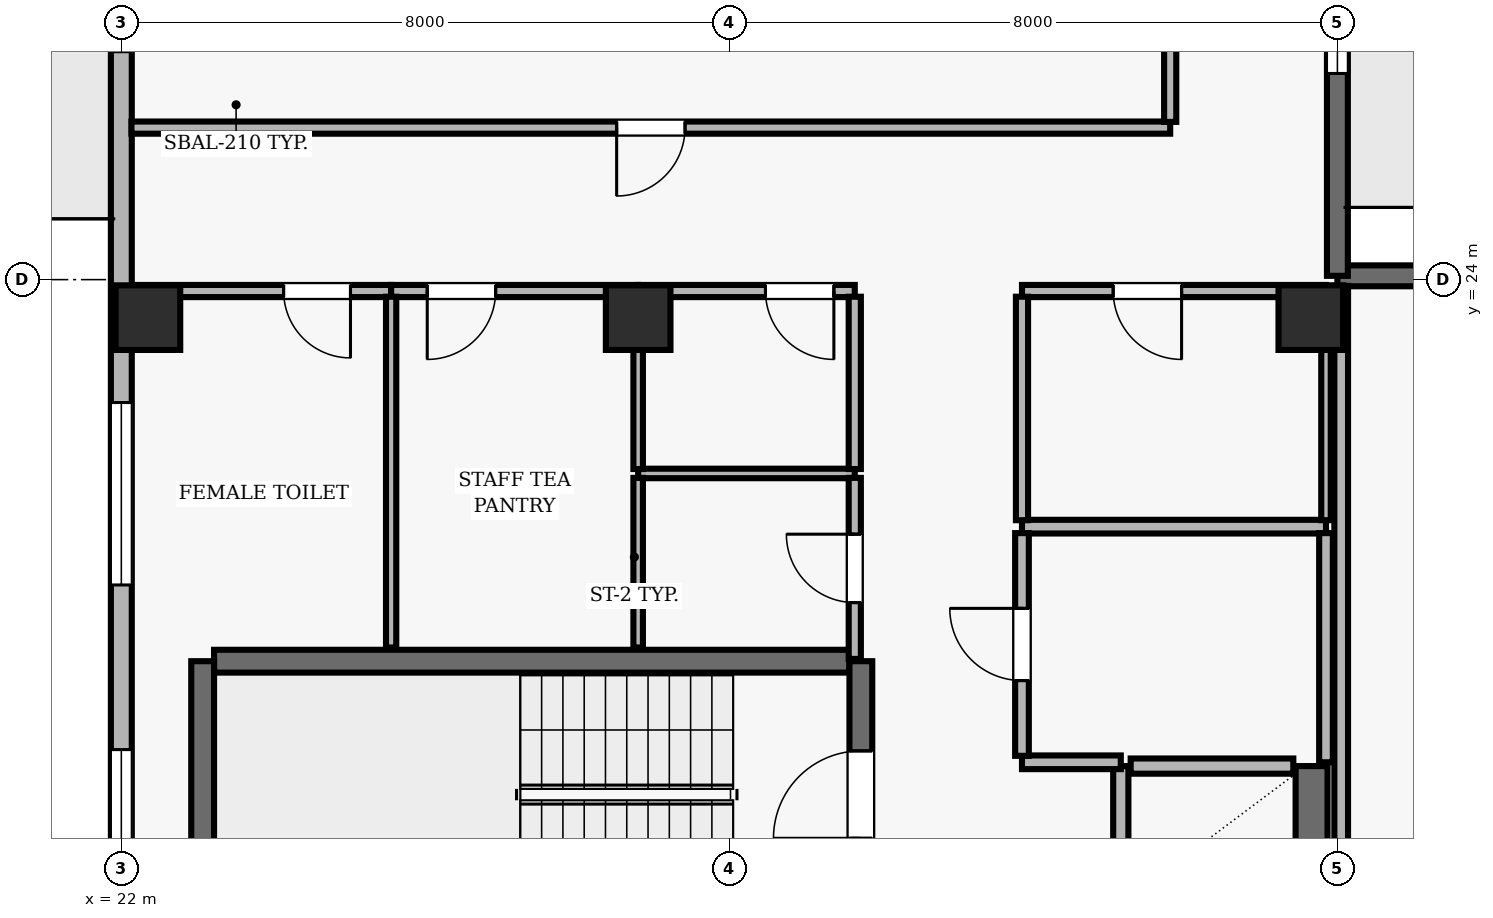
"""IFC4 building model, lengths in metres.
Left out: names, types, materials, properties, quantities, classifications, styles, units other than length and angle.
Written with IfcOpenShell. Run it as: python <this file> out.ifc"""

import sys

from ifc_helpers import new_model, si_unit, direction, frame, frame_2d, origin, origin_2d, place, context, subcontext, project, spatial, rectangle, extrude, element, fill, save


model = new_model("IFC4")
c1 = context("Model", 3, precision=1e-05, world=origin(), true_north=direction((0.0, 1.0)))
c2 = subcontext(c1, "Body", "Model", "MODEL_VIEW")
j1 = project(units=[si_unit("LENGTHUNIT", "METRE"), si_unit("PLANEANGLEUNIT", "RADIAN")], contexts=[c1])
p1 = place(None, origin())
s1 = spatial("IfcSite", under=j1, at=p1, CompositionType="ELEMENT")
p2 = place(p1, origin())
s2 = spatial("IfcBuilding", under=s1, at=p2, CompositionType="ELEMENT")
p3 = place(p2, frame((0.0, 0.0, 263.8)))
s3 = spatial("IfcBuildingStorey", under=s2, at=p3, CompositionType="ELEMENT", Elevation=263.8)
for number, where, z_axis, x_axis in (
    (1, (22.35, 23.5, 0.0), (0.0, 0.0, 1.0), (1.0, 0.0, 0.0)),
    (2, (28.8, 23.5, 0.0), (0.0, 0.0, 1.0), (1.0, 0.0, 0.0)),
    (3, (37.65, 23.5, 0.0), (0.0, 0.0, 1.0), (1.0, 0.0, 0.0)),
):
    element("IfcColumn", number, at=place(p3, frame(where, z_axis=z_axis, x_axis=x_axis)), inside=s3, PredefinedType="COLUMN", context=c2, shape_type="SweptSolid", body=[
        extrude(rectangle(XDim=0.85, YDim=0.85, at=origin_2d()), origin(), (0.0, 0.0, 1.0), 3.9),
    ])
p4 = place(p3, frame((43.0, 24.05, 0.0), z_axis=(0.0, 0.0, 1.0), x_axis=(-1.0, 0.0, 0.0)))
e4 = element("IfcWall", 4, at=p4, inside=s3, PredefinedType="SOLIDWALL", context=c2, shape_type="SweptSolid", body=[
    extrude(rectangle(XDim=5.0, YDim=0.275, at=frame_2d((2.5, 0.0))), origin(), (0.0, 0.0, 1.0), 3.69),
])
p5 = place(p3, frame((38.0, 24.05, 0.0), z_axis=(0.0, 0.0, 1.0), x_axis=(0.0, 1.0, 0.0)))
e5 = element("IfcWall", 5, at=p5, inside=s3, PredefinedType="SOLIDWALL", context=c2, shape_type="SweptSolid", body=[
    extrude(rectangle(XDim=11.25, YDim=0.275, at=frame_2d((5.625, 0.0))), origin(), (0.0, 0.0, 1.0), 3.69),
])
p6 = place(p5, frame((7.425, 0.0, 0.0)))
e6 = element("IfcOpeningElement", 6, at=p6, cuts=e5, PredefinedType="OPENING", context=c2, shape_type="SweptSolid", body=[
    extrude(rectangle(XDim=1.0, YDim=2.2, at=frame_2d((0.5, 1.1))), frame((0.0, 0.147, 0.0), z_axis=(0.0, -1.0, 0.0), x_axis=(1.0, 0.0, 0.0)), (0.0, 0.0, 1.0), 0.295),
])
p7 = place(p5, frame((2.662, 0.0, 0.9)))
e7 = element("IfcOpeningElement", 7, at=p7, cuts=e5, PredefinedType="OPENING", context=c2, shape_type="SweptSolid", body=[
    extrude(rectangle(XDim=1.2, YDim=1.6, at=frame_2d((0.6, 0.8))), frame((0.0, 0.147, 0.0), z_axis=(0.0, -1.0, 0.0), x_axis=(1.0, 0.0, 0.0)), (0.0, 0.0, 1.0), 0.295),
])
p8 = place(p3, frame((22.0, 35.3, 0.0), z_axis=(0.0, 0.0, 1.0), x_axis=(0.0, -1.0, 0.0)))
e8 = element("IfcWall", 8, at=p8, inside=s3, PredefinedType="SOLIDWALL", context=c2, shape_type="SweptSolid", body=[
    extrude(rectangle(XDim=32.8, YDim=0.275, at=frame_2d((16.4, 0.0))), origin(), (0.0, 0.0, 1.0), 3.69),
])
p9 = place(p8, frame((7.3, 0.0, 0.0)))
e9 = element("IfcOpeningElement", 9, at=p9, cuts=e8, PredefinedType="OPENING", context=c2, shape_type="SweptSolid", body=[
    extrude(rectangle(XDim=1.0, YDim=2.2, at=frame_2d((0.5, 1.1))), frame((0.0, 0.147, 0.0), z_axis=(0.0, -1.0, 0.0), x_axis=(1.0, 0.0, 0.0)), (0.0, 0.0, 1.0), 0.295),
])
p10 = place(p8, frame((12.917, 0.0, 0.9)))
e10 = element("IfcOpeningElement", 10, at=p10, cuts=e8, PredefinedType="OPENING", context=c2, shape_type="SweptSolid", body=[
    extrude(rectangle(XDim=2.4, YDim=1.6, at=frame_2d((1.2, 0.8))), frame((0.0, 0.147, 0.0), z_axis=(0.0, -1.0, 0.0), x_axis=(1.0, 0.0, 0.0)), (0.0, 0.0, 1.0), 0.295),
])
p11 = place(p8, frame((17.483, 0.0, 0.9)))
e11 = element("IfcOpeningElement", 11, at=p11, cuts=e8, PredefinedType="OPENING", context=c2, shape_type="SweptSolid", body=[
    extrude(rectangle(XDim=2.4, YDim=1.6, at=frame_2d((1.2, 0.8))), frame((0.0, 0.147, 0.0), z_axis=(0.0, -1.0, 0.0), x_axis=(1.0, 0.0, 0.0)), (0.0, 0.0, 1.0), 0.295),
])
p12 = place(p8, frame((23.4, 0.0, 0.9)))
e12 = element("IfcOpeningElement", 12, at=p12, cuts=e8, PredefinedType="OPENING", context=c2, shape_type="SweptSolid", body=[
    extrude(rectangle(XDim=2.4, YDim=1.6, at=frame_2d((1.2, 0.8))), frame((0.0, 0.147, 0.0), z_axis=(0.0, -1.0, 0.0), x_axis=(1.0, 0.0, 0.0)), (0.0, 0.0, 1.0), 0.295),
])
p13 = place(p3, frame((31.58, 18.98, 0.0), z_axis=(0.0, 0.0, 1.0), x_axis=(-1.0, 0.0, 0.0)))
e13 = element("IfcWall", 13, at=p13, inside=s3, PredefinedType="SHEAR", context=c2, shape_type="SweptSolid", body=[
    extrude(rectangle(XDim=8.36, YDim=0.3, at=frame_2d((4.18, 0.0))), origin(), (0.0, 0.0, 1.0), 3.69),
])
p14 = place(p3, frame((23.07, 18.98, 0.0), z_axis=(0.0, 0.0, 1.0), x_axis=(0.0, -1.0, 0.0)))
e14 = element("IfcWall", 14, at=p14, inside=s3, PredefinedType="SHEAR", context=c2, shape_type="SweptSolid", body=[
    extrude(rectangle(XDim=3.51, YDim=0.3, at=frame_2d((1.755, 0.0))), origin(), (0.0, 0.0, 1.0), 3.69),
])
p15 = place(p3, frame((31.73, 15.47, 0.0), z_axis=(0.0, 0.0, 1.0), x_axis=(0.0, 1.0, 0.0)))
e15 = element("IfcWall", 15, at=p15, inside=s3, PredefinedType="SHEAR", context=c2, shape_type="SweptSolid", body=[
    extrude(rectangle(XDim=3.51, YDim=0.3, at=frame_2d((1.755, 0.0))), origin(), (0.0, 0.0, 1.0), 3.69),
])
p16 = place(p15, frame((1.18, 0.0, 0.0)))
e16 = element("IfcOpeningElement", 16, at=p16, cuts=e15, PredefinedType="OPENING", context=c2, shape_type="SweptSolid", body=[
    extrude(rectangle(XDim=1.15, YDim=2.15, at=frame_2d((0.575, 1.075))), frame((0.0, 0.16, 0.0), z_axis=(0.0, -1.0, 0.0), x_axis=(1.0, 0.0, 0.0)), (0.0, 0.0, 1.0), 0.32),
])
p17 = place(p3, frame((35.15, 17.6, 0.0), z_axis=(0.0, 0.0, 1.0), x_axis=(0.0, -1.0, 0.0)))
e17 = element("IfcWall", 17, at=p17, inside=s3, PredefinedType="SOLIDWALL", context=c2, shape_type="SweptSolid", body=[
    extrude(rectangle(XDim=1.85, YDim=0.2, at=frame_2d((0.925, 0.0))), origin(), (0.0, 0.0, 1.0), 3.69),
])
p18 = place(p3, frame((37.66, 15.75, 0.0), z_axis=(0.0, 0.0, 1.0), x_axis=(0.0, 1.0, 0.0)))
e18 = element("IfcWall", 18, at=p18, inside=s3, PredefinedType="SHEAR", context=c2, shape_type="SweptSolid", body=[
    extrude(rectangle(XDim=1.85, YDim=0.42, at=frame_2d((0.925, 0.0))), origin(), (0.0, 0.0, 1.0), 3.69),
])
p19 = place(p3, frame((37.42, 17.6, 0.0), z_axis=(0.0, 0.0, 1.0), x_axis=(-1.0, 0.0, 0.0)))
e19 = element("IfcWall", 19, at=p19, inside=s3, PredefinedType="SOLIDWALL", context=c2, shape_type="SweptSolid", body=[
    extrude(rectangle(XDim=2.14, YDim=0.2, at=frame_2d((1.07, 0.0))), origin(), (0.0, 0.0, 1.0), 3.69),
])
p20 = place(p3, frame((25.55, 23.85, 0.0), z_axis=(0.0, 0.0, 1.0), x_axis=(-1.0, 0.0, 0.0)))
e20 = element("IfcWall", 20, at=p20, inside=s3, PredefinedType="PARTITIONING", context=c2, shape_type="SweptSolid", body=[
    extrude(rectangle(XDim=3.35, YDim=0.16, at=frame_2d((1.675, 0.0))), origin(), (0.0, 0.0, 1.0), 3.221),
])
p21 = place(p20, frame((0.535, 0.0, 0.0)))
e21 = element("IfcOpeningElement", 21, at=p21, cuts=e20, PredefinedType="OPENING", context=c2, shape_type="SweptSolid", body=[
    extrude(rectangle(XDim=0.88, YDim=2.1, at=frame_2d((0.44, 1.05))), frame((0.0, 0.09, 0.0), z_axis=(0.0, -1.0, 0.0), x_axis=(1.0, 0.0, 0.0)), (0.0, 0.0, 1.0), 0.18),
])
p22 = place(p3, frame((28.8, 23.85, 0.0), z_axis=(0.0, 0.0, 1.0), x_axis=(-1.0, 0.0, 0.0)))
e22 = element("IfcWall", 22, at=p22, inside=s3, PredefinedType="PARTITIONING", context=c2, shape_type="SweptSolid", body=[
    extrude(rectangle(XDim=3.25, YDim=0.16, at=frame_2d((1.625, 0.0))), origin(), (0.0, 0.0, 1.0), 3.221),
])
p23 = place(p22, frame((1.875, 0.0, 0.0)))
e23 = element("IfcOpeningElement", 23, at=p23, cuts=e22, PredefinedType="OPENING", context=c2, shape_type="SweptSolid", body=[
    extrude(rectangle(XDim=0.9, YDim=2.1, at=frame_2d((0.45, 1.05))), frame((0.0, 0.09, 0.0), z_axis=(0.0, -1.0, 0.0), x_axis=(1.0, 0.0, 0.0)), (0.0, 0.0, 1.0), 0.18),
])
p24 = place(p3, frame((31.65, 21.45, 0.0), z_axis=(0.0, 0.0, 1.0), x_axis=(-1.0, 0.0, 0.0)))
e24 = element("IfcWall", 24, at=p24, inside=s3, PredefinedType="PARTITIONING", context=c2, shape_type="SweptSolid", body=[
    extrude(rectangle(XDim=2.85, YDim=0.125, at=frame_2d((1.425, 0.0))), origin(), (0.0, 0.0, 1.0), 3.69),
])
p25 = place(p3, frame((31.65, 23.85, 0.0), z_axis=(0.0, 0.0, 1.0), x_axis=(-1.0, 0.0, 0.0)))
e25 = element("IfcWall", 25, at=p25, inside=s3, PredefinedType="PARTITIONING", context=c2, shape_type="SweptSolid", body=[
    extrude(rectangle(XDim=2.85, YDim=0.16, at=frame_2d((1.425, 0.0))), origin(), (0.0, 0.0, 1.0), 3.221),
])
p26 = place(p25, frame((0.275, 0.0, 0.0)))
e26 = element("IfcOpeningElement", 26, at=p26, cuts=e25, PredefinedType="OPENING", context=c2, shape_type="SweptSolid", body=[
    extrude(rectangle(XDim=0.9, YDim=2.1, at=frame_2d((0.45, 1.05))), frame((0.0, 0.09, 0.0), z_axis=(0.0, -1.0, 0.0), x_axis=(1.0, 0.0, 0.0)), (0.0, 0.0, 1.0), 0.18),
])
p27 = place(p3, frame((33.85, 17.65, 0.0), z_axis=(0.0, 0.0, 1.0), x_axis=(1.0, 0.0, 0.0)))
e27 = element("IfcWall", 27, at=p27, inside=s3, PredefinedType="PARTITIONING", context=c2, shape_type="SweptSolid", body=[
    extrude(rectangle(XDim=1.3, YDim=0.18, at=frame_2d((0.65, 0.0))), origin(), (0.0, 0.0, 1.0), 3.69),
])
p28 = place(p3, frame((35.8, 26.0, 0.0), z_axis=(0.0, 0.0, 1.0), x_axis=(-1.0, 0.0, 0.0)))
e28 = element("IfcWall", 28, at=p28, inside=s3, PredefinedType="PARTITIONING", context=c2, shape_type="SweptSolid", body=[
    extrude(rectangle(XDim=13.667, YDim=0.16, at=frame_2d((6.833, 0.0))), origin(), (0.0, 0.0, 1.0), 3.69),
])
p29 = place(p28, frame((6.383, 0.0, 0.0)))
e29 = element("IfcOpeningElement", 29, at=p29, cuts=e28, PredefinedType="OPENING", context=c2, shape_type="SweptSolid", body=[
    extrude(rectangle(XDim=0.9, YDim=2.1, at=frame_2d((0.45, 1.05))), frame((0.0, 0.09, 0.0), z_axis=(0.0, -1.0, 0.0), x_axis=(1.0, 0.0, 0.0)), (0.0, 0.0, 1.0), 0.18),
])
p30 = place(p3, frame((37.85, 20.75, 0.0), z_axis=(0.0, 0.0, 1.0), x_axis=(-1.0, 0.0, 0.0)))
e30 = element("IfcWall", 30, at=p30, inside=s3, PredefinedType="PARTITIONING", context=c2, shape_type="SweptSolid", body=[
    extrude(rectangle(XDim=4.0, YDim=0.18, at=frame_2d((2.0, 0.0))), origin(), (0.0, 0.0, 1.0), 3.69),
])
p31 = place(p3, frame((37.85, 23.85, 0.0), z_axis=(0.0, 0.0, 1.0), x_axis=(-1.0, 0.0, 0.0)))
e31 = element("IfcWall", 31, at=p31, inside=s3, PredefinedType="PARTITIONING", context=c2, shape_type="SweptSolid", body=[
    extrude(rectangle(XDim=4.0, YDim=0.16, at=frame_2d((2.0, 0.0))), origin(), (0.0, 0.0, 1.0), 3.221),
])
p32 = place(p31, frame((1.9, 0.0, 0.0)))
e32 = element("IfcOpeningElement", 32, at=p32, cuts=e31, PredefinedType="OPENING", context=c2, shape_type="SweptSolid", body=[
    extrude(rectangle(XDim=0.9, YDim=2.1, at=frame_2d((0.45, 1.05))), frame((0.0, 0.09, 0.0), z_axis=(0.0, -1.0, 0.0), x_axis=(1.0, 0.0, 0.0)), (0.0, 0.0, 1.0), 0.18),
])
p33 = place(p3, frame((25.55, 19.16, 0.0), z_axis=(0.0, 0.0, 1.0), x_axis=(0.0, 1.0, 0.0)))
e33 = element("IfcWall", 33, at=p33, inside=s3, PredefinedType="PARTITIONING", context=c2, shape_type="SweptSolid", body=[
    extrude(rectangle(XDim=4.615, YDim=0.135, at=frame_2d((2.308, 0.0))), origin(), (0.0, 0.0, 1.0), 3.69),
])
p34 = place(p3, frame((28.8, 21.392, 0.0), z_axis=(0.0, 0.0, 1.0), x_axis=(0.0, -1.0, 0.0)))
e34 = element("IfcWall", 34, at=p34, inside=s3, PredefinedType="PARTITIONING", context=c2, shape_type="SweptSolid", body=[
    extrude(rectangle(XDim=2.232, YDim=0.125, at=frame_2d((1.116, 0.0))), origin(), (0.0, 0.0, 1.0), 3.69),
])
p35 = place(p3, frame((28.8, 23.775, 0.0), z_axis=(0.0, 0.0, 1.0), x_axis=(0.0, -1.0, 0.0)))
e35 = element("IfcWall", 35, at=p35, inside=s3, PredefinedType="PARTITIONING", context=c2, shape_type="SweptSolid", body=[
    extrude(rectangle(XDim=2.267, YDim=0.125, at=frame_2d((1.133, 0.0))), origin(), (0.0, 0.0, 1.0), 3.69),
])
p36 = place(p3, frame((31.65, 19.01, 0.0), z_axis=(0.0, 0.0, 1.0), x_axis=(0.0, 1.0, 0.0)))
e36 = element("IfcWall", 36, at=p36, inside=s3, PredefinedType="PARTITIONING", context=c2, shape_type="SweptSolid", body=[
    extrude(rectangle(XDim=2.382, YDim=0.16, at=frame_2d((1.191, 0.0))), origin(), (0.0, 0.0, 1.0), 3.69),
])
p37 = place(p36, frame((0.741, 0.0, 0.0)))
e37 = element("IfcOpeningElement", 37, at=p37, cuts=e36, PredefinedType="OPENING", context=c2, shape_type="SweptSolid", body=[
    extrude(rectangle(XDim=0.9, YDim=2.1, at=frame_2d((0.45, 1.05))), frame((0.0, 0.09, 0.0), z_axis=(0.0, -1.0, 0.0), x_axis=(1.0, 0.0, 0.0)), (0.0, 0.0, 1.0), 0.18),
])
p38 = place(p3, frame((31.65, 23.775, 0.0), z_axis=(0.0, 0.0, 1.0), x_axis=(0.0, -1.0, 0.0)))
e38 = element("IfcWall", 38, at=p38, inside=s3, PredefinedType="PARTITIONING", context=c2, shape_type="SweptSolid", body=[
    extrude(rectangle(XDim=2.267, YDim=0.16, at=frame_2d((1.133, 0.0))), origin(), (0.0, 0.0, 1.0), 3.69),
])
p39 = place(p3, frame((33.85, 17.735, 0.0), z_axis=(0.0, 0.0, 1.0), x_axis=(0.0, 1.0, 0.0)))
e39 = element("IfcWall", 39, at=p39, inside=s3, PredefinedType="PARTITIONING", context=c2, shape_type="SweptSolid", body=[
    extrude(rectangle(XDim=2.93, YDim=0.18, at=frame_2d((1.465, 0.0))), origin(), (0.0, 0.0, 1.0), 3.69),
])
p40 = place(p39, frame((0.99, 0.0, 0.0)))
e40 = element("IfcOpeningElement", 40, at=p40, cuts=e39, PredefinedType="OPENING", context=c2, shape_type="SweptSolid", body=[
    extrude(rectangle(XDim=0.95, YDim=2.1, at=frame_2d((0.475, 1.05))), frame((0.0, 0.1, 0.0), z_axis=(0.0, -1.0, 0.0), x_axis=(1.0, 0.0, 0.0)), (0.0, 0.0, 1.0), 0.2),
])
p41 = place(p3, frame((33.85, 20.835, 0.0), z_axis=(0.0, 0.0, 1.0), x_axis=(0.0, 1.0, 0.0)))
e41 = element("IfcWall", 41, at=p41, inside=s3, PredefinedType="PARTITIONING", context=c2, shape_type="SweptSolid", body=[
    extrude(rectangle(XDim=2.94, YDim=0.16, at=frame_2d((1.47, 0.0))), origin(), (0.0, 0.0, 1.0), 3.69),
])
p42 = place(p3, frame((35.8, 28.892, 0.0), z_axis=(0.0, 0.0, 1.0), x_axis=(0.0, -1.0, 0.0)))
e42 = element("IfcWall", 42, at=p42, inside=s3, PredefinedType="PARTITIONING", context=c2, shape_type="SweptSolid", body=[
    extrude(rectangle(XDim=2.817, YDim=0.16, at=frame_2d((1.409, 0.0))), origin(), (0.0, 0.0, 1.0), 3.69),
])
p43 = place(p3, frame((37.85, 17.65, 0.0), z_axis=(0.0, 0.0, 1.0), x_axis=(0.0, 1.0, 0.0)))
e43 = element("IfcWall", 43, at=p43, inside=s3, PredefinedType="PARTITIONING", context=c2, shape_type="SweptSolid", body=[
    extrude(rectangle(XDim=3.015, YDim=0.18, at=frame_2d((1.508, 0.0))), origin(), (0.0, 0.0, 1.0), 3.221),
])
p44 = place(p3, frame((37.85, 20.835, 0.0), z_axis=(0.0, 0.0, 1.0), x_axis=(0.0, 1.0, 0.0)))
e44 = element("IfcWall", 44, at=p44, inside=s3, PredefinedType="PARTITIONING", context=c2, shape_type="SweptSolid", body=[
    extrude(rectangle(XDim=2.94, YDim=0.125, at=frame_2d((1.47, 0.0))), origin(), (0.0, 0.0, 1.0), 3.221),
])
p45 = place(p3, frame((38.05, 23.918, 0.0), z_axis=(0.0, 0.0, 1.0), x_axis=(0.0, -1.0, 0.0)))
e45 = element("IfcWall", 45, at=p45, inside=s3, PredefinedType="PARTITIONING", context=c2, shape_type="SweptSolid", body=[
    extrude(rectangle(XDim=7.843, YDim=0.18, at=frame_2d((3.921, 0.0))), origin(), (0.0, 0.0, 1.0), 3.221),
])
p46 = place(p7, origin())
e46 = element("IfcWindow", 46, at=p46, inside=s3, PartitioningType="SINGLE_PANEL", PredefinedType="WINDOW", context=c2, shape_type="SweptSolid", body=[
    extrude(rectangle(XDim=1.2, YDim=1.6, at=frame_2d((0.6, 0.8))), frame((0.0, 0.03, 0.0), z_axis=(0.0, -1.0, 0.0), x_axis=(1.0, 0.0, 0.0)), (0.0, 0.0, 1.0), 0.06),
])
fill(e7, e46)
p47 = place(p10, origin())
e47 = element("IfcWindow", 47, at=p47, inside=s3, PartitioningType="SINGLE_PANEL", PredefinedType="WINDOW", context=c2, shape_type="SweptSolid", body=[
    extrude(rectangle(XDim=2.4, YDim=1.6, at=frame_2d((1.2, 0.8))), frame((0.0, 0.03, 0.0), z_axis=(0.0, -1.0, 0.0), x_axis=(1.0, 0.0, 0.0)), (0.0, 0.0, 1.0), 0.06),
])
fill(e10, e47)
p48 = place(p11, origin())
e48 = element("IfcWindow", 48, at=p48, inside=s3, PartitioningType="SINGLE_PANEL", PredefinedType="WINDOW", context=c2, shape_type="SweptSolid", body=[
    extrude(rectangle(XDim=2.4, YDim=1.6, at=frame_2d((1.2, 0.8))), frame((0.0, 0.03, 0.0), z_axis=(0.0, -1.0, 0.0), x_axis=(1.0, 0.0, 0.0)), (0.0, 0.0, 1.0), 0.06),
])
fill(e11, e48)
p49 = place(p16, origin())
e49 = element("IfcDoor", 49, at=p49, inside=s3, OperationType="SINGLE_SWING_LEFT", PredefinedType="DOOR", context=c2, shape_type="SweptSolid", body=[
    extrude(rectangle(XDim=1.15, YDim=2.15, at=frame_2d((0.575, 1.075))), frame((0.0, 0.025, 0.0), z_axis=(0.0, -1.0, 0.0), x_axis=(1.0, 0.0, 0.0)), (0.0, 0.0, 1.0), 0.05),
])
fill(e16, e49)
p50 = place(p40, origin())
e50 = element("IfcDoor", 50, at=p50, inside=s3, OperationType="SINGLE_SWING_RIGHT", PredefinedType="DOOR", context=c2, shape_type="SweptSolid", body=[
    extrude(rectangle(XDim=0.95, YDim=2.1, at=frame_2d((0.475, 1.05))), frame((0.0, 0.025, 0.0), z_axis=(0.0, -1.0, 0.0), x_axis=(1.0, 0.0, 0.0)), (0.0, 0.0, 1.0), 0.05),
])
fill(e40, e50)
p51 = place(p32, origin())
e51 = element("IfcDoor", 51, at=p51, inside=s3, OperationType="SINGLE_SWING_LEFT", PredefinedType="DOOR", context=c2, shape_type="SweptSolid", body=[
    extrude(rectangle(XDim=0.9, YDim=2.1, at=frame_2d((0.45, 1.05))), frame((0.0, 0.025, 0.0), z_axis=(0.0, -1.0, 0.0), x_axis=(1.0, 0.0, 0.0)), (0.0, 0.0, 1.0), 0.05),
])
fill(e32, e51)
p52 = place(p37, origin())
e52 = element("IfcDoor", 52, at=p52, inside=s3, OperationType="SINGLE_SWING_RIGHT", PredefinedType="DOOR", context=c2, shape_type="SweptSolid", body=[
    extrude(rectangle(XDim=0.9, YDim=2.1, at=frame_2d((0.45, 1.05))), frame((0.0, 0.025, 0.0), z_axis=(0.0, -1.0, 0.0), x_axis=(1.0, 0.0, 0.0)), (0.0, 0.0, 1.0), 0.05),
])
fill(e37, e52)
p53 = place(p26, origin())
e53 = element("IfcDoor", 53, at=p53, inside=s3, OperationType="SINGLE_SWING_LEFT", PredefinedType="DOOR", context=c2, shape_type="SweptSolid", body=[
    extrude(rectangle(XDim=0.9, YDim=2.1, at=frame_2d((0.45, 1.05))), frame((0.0, 0.025, 0.0), z_axis=(0.0, -1.0, 0.0), x_axis=(1.0, 0.0, 0.0)), (0.0, 0.0, 1.0), 0.05),
])
fill(e26, e53)
p54 = place(p21, origin())
e54 = element("IfcDoor", 54, at=p54, inside=s3, OperationType="SINGLE_SWING_LEFT", PredefinedType="DOOR", context=c2, shape_type="SweptSolid", body=[
    extrude(rectangle(XDim=0.88, YDim=2.1, at=frame_2d((0.44, 1.05))), frame((0.0, 0.025, 0.0), z_axis=(0.0, -1.0, 0.0), x_axis=(1.0, 0.0, 0.0)), (0.0, 0.0, 1.0), 0.05),
])
fill(e21, e54)
p55 = place(p23, origin())
e55 = element("IfcDoor", 55, at=p55, inside=s3, OperationType="SINGLE_SWING_RIGHT", PredefinedType="DOOR", context=c2, shape_type="SweptSolid", body=[
    extrude(rectangle(XDim=0.9, YDim=2.1, at=frame_2d((0.45, 1.05))), frame((0.0, 0.025, 0.0), z_axis=(0.0, -1.0, 0.0), x_axis=(1.0, 0.0, 0.0)), (0.0, 0.0, 1.0), 0.05),
])
fill(e23, e55)
p56 = place(p29, origin())
e56 = element("IfcDoor", 56, at=p56, inside=s3, OperationType="SINGLE_SWING_RIGHT", PredefinedType="DOOR", context=c2, shape_type="SweptSolid", body=[
    extrude(rectangle(XDim=0.9, YDim=2.1, at=frame_2d((0.45, 1.05))), frame((0.0, 0.025, 0.0), z_axis=(0.0, -1.0, 0.0), x_axis=(1.0, 0.0, 0.0)), (0.0, 0.0, 1.0), 0.05),
])
fill(e29, e56)
save(model, sys.argv[1])
